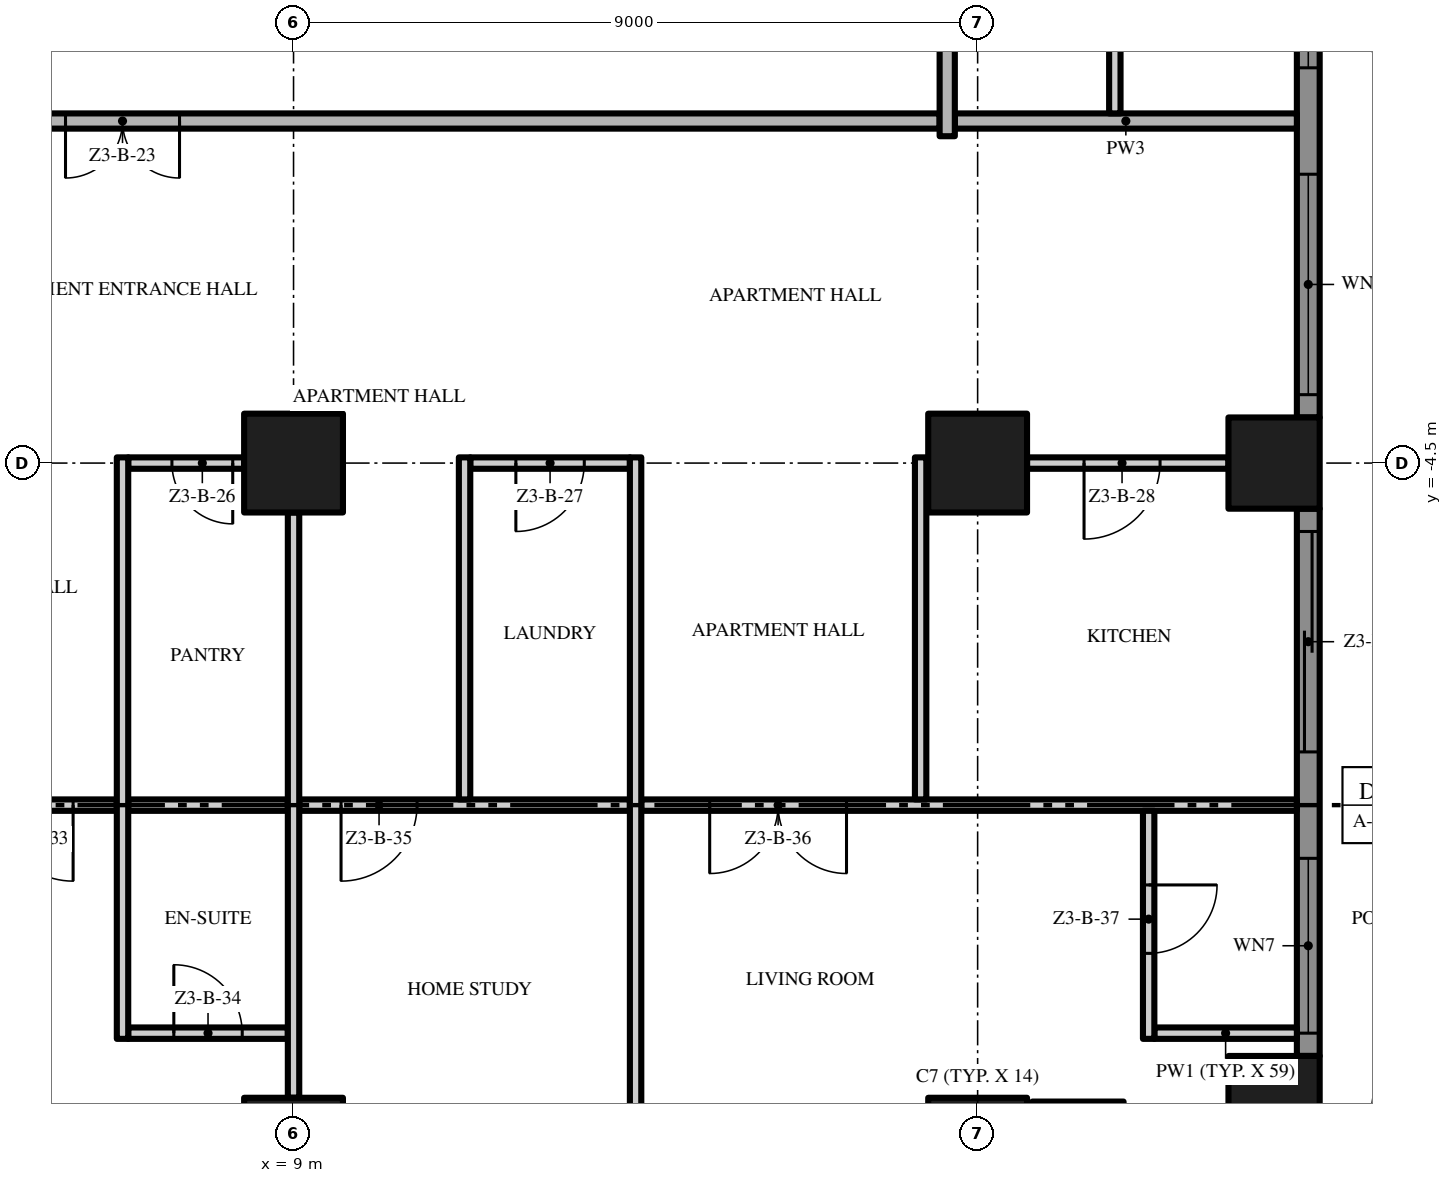
"""IFC4 building model, lengths in metres.
Left out: names, types, materials, properties, quantities, classifications, styles, units other than length and angle.
Written with IfcOpenShell. Run it as: python <this file> out.ifc"""

import sys

from ifc_helpers import new_model, si_unit, direction, frame, frame_2d, origin, origin_2d, place, context, subcontext, project, spatial, polyline, rectangle, outline, extrude, element, fill, save


model = new_model("IFC4")
c1 = context("Model", 3, precision=1e-05, world=origin(), true_north=direction((0.0, 1.0)))
c2 = subcontext(c1, "Body", "Model", "MODEL_VIEW")
j1 = project(units=[si_unit("LENGTHUNIT", "METRE"), si_unit("PLANEANGLEUNIT", "RADIAN")], contexts=[c1])
p1 = place(None, origin())
s1 = spatial("IfcSite", under=j1, at=p1, CompositionType="ELEMENT")
p2 = place(p1, origin())
s2 = spatial("IfcBuilding", under=s1, at=p2, CompositionType="ELEMENT")
p3 = place(p2, frame((0.0, 0.0, 136.4)))
s3 = spatial("IfcBuildingStorey", under=s2, at=p3, CompositionType="ELEMENT", Elevation=136.4)
for number, where, z_axis, x_axis in (
    (1, (18.0, -13.5, 0.0), (0.0, 0.0, 1.0), (1.0, 0.0, 0.0)),
    (2, (18.0, -4.5, 0.0), (0.0, 0.0, 1.0), (1.0, 0.0, 0.0)),
):
    element("IfcColumn", number, at=place(p3, frame(where, z_axis=z_axis, x_axis=x_axis)), inside=s3, PredefinedType="COLUMN", context=c2, shape_type="SweptSolid", body=[
        extrude(rectangle(XDim=1.3, YDim=1.3, at=origin_2d()), origin(), (0.0, 0.0, 1.0), 3.5),
    ])
for number, where, z_axis, x_axis in (
    (3, (21.9, -12.9, 0.0), (0.0, 0.0, 1.0), (1.0, 0.0, 0.0)),
    (4, (19.32, -13.5, 0.0), (0.0, 0.0, 1.0), (1.0, 0.0, 0.0)),
    (5, (21.9, -4.5, 0.0), (0.0, 0.0, 1.0), (1.0, 0.0, 0.0)),
):
    element("IfcColumn", number, at=place(p3, frame(where, z_axis=z_axis, x_axis=x_axis)), inside=s3, PredefinedType="COLUMN", context=c2, shape_type="SweptSolid", body=[
        extrude(rectangle(XDim=1.2, YDim=1.2, at=origin_2d()), origin(), (0.0, 0.0, 1.0), 3.5),
    ])
for number, where, z_axis, x_axis in (
    (6, (9.0, -13.5, 0.0), (0.0, 0.0, 1.0), (1.0, 0.0, 0.0)),
    (7, (9.0, -4.5, 0.0), (0.0, 0.0, 1.0), (1.0, 0.0, 0.0)),
):
    element("IfcColumn", number, at=place(p3, frame(where, z_axis=z_axis, x_axis=x_axis)), inside=s3, PredefinedType="COLUMN", context=c2, shape_type="SweptSolid", body=[
        extrude(rectangle(XDim=1.3, YDim=1.3, at=origin_2d()), origin(), (0.0, 0.0, 1.0), 3.5),
    ])
p4 = place(p3, frame((22.35, -5.1, 0.0), z_axis=(0.0, 0.0, 1.0), x_axis=(0.0, -1.0, 0.0)))
e8 = element("IfcWall", 8, at=p4, inside=s3, PredefinedType="SOLIDWALL", context=c2, shape_type="SweptSolid", body=[
    extrude(rectangle(XDim=7.2, YDim=0.3, at=frame_2d((3.6, 0.0))), origin(), (0.0, 0.0, 1.0), 3.5),
])
p5 = place(p4, frame((4.6, 0.0, 0.45)))
e9 = element("IfcOpeningElement", 9, at=p5, cuts=e8, PredefinedType="OPENING", context=c2, shape_type="SweptSolid", body=[
    extrude(rectangle(XDim=2.3, YDim=2.65, at=frame_2d((1.15, 1.325))), frame((0.0, 0.16, 0.0), z_axis=(0.0, -1.0, 0.0), x_axis=(1.0, 0.0, 0.0)), (0.0, 0.0, 1.0), 0.32),
])
p6 = place(p4, frame((0.3, 0.0, 0.0)))
e10 = element("IfcOpeningElement", 10, at=p6, cuts=e8, PredefinedType="OPENING", context=c2, shape_type="SweptSolid", body=[
    extrude(rectangle(XDim=2.9, YDim=2.4, at=frame_2d((1.45, 1.2))), frame((0.0, 0.16, 0.0), z_axis=(0.0, -1.0, 0.0), x_axis=(1.0, 0.0, 0.0)), (0.0, 0.0, 1.0), 0.32),
])
p7 = place(p3, frame((22.35, 3.9, 0.0), z_axis=(0.0, 0.0, 1.0), x_axis=(0.0, -1.0, 0.0)))
e11 = element("IfcWall", 11, at=p7, inside=s3, PredefinedType="SOLIDWALL", context=c2, shape_type="SweptSolid", body=[
    extrude(rectangle(XDim=7.8, YDim=0.3, at=frame_2d((3.9, 0.0))), origin(), (0.0, 0.0, 1.0), 3.5),
])
p8 = place(p7, frame((4.6, 0.0, 0.45)))
e12 = element("IfcOpeningElement", 12, at=p8, cuts=e11, PredefinedType="OPENING", context=c2, shape_type="SweptSolid", body=[
    extrude(rectangle(XDim=2.9, YDim=2.65, at=frame_2d((1.45, 1.325))), frame((0.0, 0.16, 0.0), z_axis=(0.0, -1.0, 0.0), x_axis=(1.0, 0.0, 0.0)), (0.0, 0.0, 1.0), 0.32),
])
p9 = place(p7, frame((0.3, 0.0, 0.45)))
e13 = element("IfcOpeningElement", 13, at=p9, cuts=e11, PredefinedType="OPENING", context=c2, shape_type="SweptSolid", body=[
    extrude(rectangle(XDim=2.9, YDim=2.65, at=frame_2d((1.45, 1.325))), frame((0.0, 0.16, 0.0), z_axis=(0.0, -1.0, 0.0), x_axis=(1.0, 0.0, 0.0)), (0.0, 0.0, 1.0), 0.32),
])
p10 = place(p3, origin())
e14 = element("IfcWall", 14, at=p10, inside=s3, PredefinedType="USERDEFINED", context=c2, shape_type="SweptSolid", body=[
    extrude(outline(polyline([(23.1, -13.5), (23.329, -12.0), (23.929, -10.5), (24.671, -9.0), (25.271, -7.5), (25.5, -6.0), (25.271, -4.5), (24.671, -3.0), (23.929, -1.5), (23.329, 0.0), (23.1, 1.5), (23.329, 3.0), (23.929, 4.5), (24.671, 6.0), (25.271, 7.5), (25.5, 9.0), (25.271, 10.5), (24.671, 12.0), (23.929, 13.5), (23.329, 15.0), (23.1, 16.5), (23.329, 18.0), (23.082, 18.038), (22.847, 16.5), (23.086, 14.934), (23.701, 13.398), (24.442, 11.898), (25.028, 10.434), (25.247, 9.0), (25.028, 7.566), (24.442, 6.102), (23.701, 4.602), (23.086, 3.066), (22.847, 1.5), (23.086, -0.066), (23.701, -1.602), (24.442, -3.102), (25.028, -4.566), (25.247, -6.0), (25.028, -7.434), (24.442, -8.898), (23.701, -10.398), (23.086, -11.934), (22.853, -13.462), (23.1, -13.5)])), origin(), (0.0, 0.0, 1.0), 0.9),
])
p11 = place(p3, frame((6.825, -12.0, 0.0), z_axis=(0.0, 0.0, 1.0), x_axis=(1.0, 0.0, 0.0)))
e15 = element("IfcWall", 15, at=p11, inside=s3, PredefinedType="PARTITIONING", context=c2, shape_type="SweptSolid", body=[
    extrude(rectangle(XDim=2.1, YDim=0.15, at=frame_2d((1.05, 0.0))), origin(), (0.0, 0.0, 1.0), 3.5),
])
p12 = place(p11, frame((0.6, 0.0, 0.0)))
e16 = element("IfcOpeningElement", 16, at=p12, cuts=e15, PredefinedType="OPENING", context=c2, shape_type="SweptSolid", body=[
    extrude(rectangle(XDim=0.9, YDim=2.1, at=frame_2d((0.45, 1.05))), frame((0.0, 0.085, 0.0), z_axis=(0.0, -1.0, 0.0), x_axis=(1.0, 0.0, 0.0)), (0.0, 0.0, 1.0), 0.17),
])
p13 = place(p3, frame((20.325, -12.0, 0.0), z_axis=(0.0, 0.0, 1.0), x_axis=(1.0, 0.0, 0.0)))
e17 = element("IfcWall", 17, at=p13, inside=s3, PredefinedType="PARTITIONING", context=c2, shape_type="SweptSolid", body=[
    extrude(rectangle(XDim=1.875, YDim=0.15, at=frame_2d((0.938, 0.0))), origin(), (0.0, 0.0, 1.0), 3.5),
])
p14 = place(p3, frame((6.675, -9.0, 0.0), z_axis=(0.0, 0.0, 1.0), x_axis=(-1.0, 0.0, 0.0)))
e18 = element("IfcWall", 18, at=p14, inside=s3, PredefinedType="PARTITIONING", context=c2, shape_type="SweptSolid", body=[
    extrude(rectangle(XDim=4.35, YDim=0.15, at=frame_2d((2.175, 0.0))), origin(), (0.0, 0.0, 1.0), 3.5),
])
p15 = place(p14, frame((2.8, 0.0, 0.0)))
e19 = element("IfcOpeningElement", 19, at=p15, cuts=e18, PredefinedType="OPENING", context=c2, shape_type="SweptSolid", body=[
    extrude(rectangle(XDim=1.0, YDim=2.4, at=frame_2d((0.5, 1.2))), frame((0.0, 0.085, 0.0), z_axis=(0.0, -1.0, 0.0), x_axis=(1.0, 0.0, 0.0)), (0.0, 0.0, 1.0), 0.17),
])
p16 = place(p14, frame((0.575, 0.0, 0.0)))
e20 = element("IfcOpeningElement", 20, at=p16, cuts=e18, PredefinedType="OPENING", context=c2, shape_type="SweptSolid", body=[
    extrude(rectangle(XDim=1.0, YDim=2.4, at=frame_2d((0.5, 1.2))), frame((0.0, 0.085, 0.0), z_axis=(0.0, -1.0, 0.0), x_axis=(1.0, 0.0, 0.0)), (0.0, 0.0, 1.0), 0.17),
])
p17 = place(p3, frame((6.825, -9.0, 0.0), z_axis=(0.0, 0.0, 1.0), x_axis=(1.0, 0.0, 0.0)))
e21 = element("IfcWall", 21, at=p17, inside=s3, PredefinedType="PARTITIONING", context=c2, shape_type="SweptSolid", body=[
    extrude(rectangle(XDim=2.1, YDim=0.15, at=frame_2d((1.05, 0.0))), origin(), (0.0, 0.0, 1.0), 3.5),
])
p18 = place(p3, frame((13.425, -9.0, 0.0), z_axis=(0.0, 0.0, 1.0), x_axis=(-1.0, 0.0, 0.0)))
e22 = element("IfcWall", 22, at=p18, inside=s3, PredefinedType="PARTITIONING", context=c2, shape_type="SweptSolid", body=[
    extrude(rectangle(XDim=4.35, YDim=0.15, at=frame_2d((2.175, 0.0))), origin(), (0.0, 0.0, 1.0), 3.5),
])
p19 = place(p18, frame((2.8, 0.0, 0.0)))
e23 = element("IfcOpeningElement", 23, at=p19, cuts=e22, PredefinedType="OPENING", context=c2, shape_type="SweptSolid", body=[
    extrude(rectangle(XDim=1.0, YDim=2.4, at=frame_2d((0.5, 1.2))), frame((0.0, 0.085, 0.0), z_axis=(0.0, -1.0, 0.0), x_axis=(1.0, 0.0, 0.0)), (0.0, 0.0, 1.0), 0.17),
])
p20 = place(p3, frame((22.2, -9.0, 0.0), z_axis=(0.0, 0.0, 1.0), x_axis=(-1.0, 0.0, 0.0)))
e24 = element("IfcWall", 24, at=p20, inside=s3, PredefinedType="PARTITIONING", context=c2, shape_type="SweptSolid", body=[
    extrude(rectangle(XDim=8.625, YDim=0.15, at=frame_2d((4.312, 0.0))), origin(), (0.0, 0.0, 1.0), 3.5),
])
p21 = place(p20, frame((5.925, 0.0, 0.0)))
e25 = element("IfcOpeningElement", 25, at=p21, cuts=e24, PredefinedType="OPENING", context=c2, shape_type="SweptSolid", body=[
    extrude(rectangle(XDim=1.8, YDim=2.4, at=frame_2d((0.9, 1.2))), frame((0.0, 0.085, 0.0), z_axis=(0.0, -1.0, 0.0), x_axis=(1.0, 0.0, 0.0)), (0.0, 0.0, 1.0), 0.17),
])
p22 = place(p3, frame((8.35, -4.5, 0.0), z_axis=(0.0, 0.0, 1.0), x_axis=(-1.0, 0.0, 0.0)))
e26 = element("IfcWall", 26, at=p22, inside=s3, PredefinedType="PARTITIONING", context=c2, shape_type="SweptSolid", body=[
    extrude(rectangle(XDim=1.525, YDim=0.15, at=frame_2d((0.762, 0.0))), origin(), (0.0, 0.0, 1.0), 3.5),
])
p23 = place(p22, frame((0.15, 0.0, 0.0)))
e27 = element("IfcOpeningElement", 27, at=p23, cuts=e26, PredefinedType="OPENING", context=c2, shape_type="SweptSolid", body=[
    extrude(rectangle(XDim=0.8, YDim=2.0, at=frame_2d((0.4, 1.0))), frame((0.0, 0.085, 0.0), z_axis=(0.0, -1.0, 0.0), x_axis=(1.0, 0.0, 0.0)), (0.0, 0.0, 1.0), 0.17),
])
p24 = place(p3, frame((13.425, -4.5, 0.0), z_axis=(0.0, 0.0, 1.0), x_axis=(-1.0, 0.0, 0.0)))
e28 = element("IfcWall", 28, at=p24, inside=s3, PredefinedType="PARTITIONING", context=c2, shape_type="SweptSolid", body=[
    extrude(rectangle(XDim=2.1, YDim=0.15, at=frame_2d((1.05, 0.0))), origin(), (0.0, 0.0, 1.0), 3.5),
])
p25 = place(p24, frame((0.6, 0.0, 0.0)))
e29 = element("IfcOpeningElement", 29, at=p25, cuts=e28, PredefinedType="OPENING", context=c2, shape_type="SweptSolid", body=[
    extrude(rectangle(XDim=0.9, YDim=2.1, at=frame_2d((0.45, 1.05))), frame((0.0, 0.085, 0.0), z_axis=(0.0, -1.0, 0.0), x_axis=(1.0, 0.0, 0.0)), (0.0, 0.0, 1.0), 0.17),
])
p26 = place(p3, frame((21.3, -4.5, 0.0), z_axis=(0.0, 0.0, 1.0), x_axis=(-1.0, 0.0, 0.0)))
e30 = element("IfcWall", 30, at=p26, inside=s3, PredefinedType="PARTITIONING", context=c2, shape_type="SweptSolid", body=[
    extrude(rectangle(XDim=2.65, YDim=0.15, at=frame_2d((1.325, 0.0))), origin(), (0.0, 0.0, 1.0), 3.5),
])
p27 = place(p26, frame((0.9, 0.0, 0.0)))
e31 = element("IfcOpeningElement", 31, at=p27, cuts=e30, PredefinedType="OPENING", context=c2, shape_type="SweptSolid", body=[
    extrude(rectangle(XDim=1.0, YDim=2.4, at=frame_2d((0.5, 1.2))), frame((0.0, 0.085, 0.0), z_axis=(0.0, -1.0, 0.0), x_axis=(1.0, 0.0, 0.0)), (0.0, 0.0, 1.0), 0.17),
])
p28 = place(p3, frame((17.5, 0.0, 0.0), z_axis=(0.0, 0.0, 1.0), x_axis=(-1.0, 0.0, 0.0)))
e32 = element("IfcWall", 32, at=p28, inside=s3, PredefinedType="PARTITIONING", context=c2, shape_type="SweptSolid", body=[
    extrude(rectangle(XDim=35.0, YDim=0.2, at=frame_2d((17.5, 0.0))), origin(), (0.0, 0.0, 1.0), 3.5),
])
p29 = place(p28, frame((28.0, 0.0, 0.0)))
e33 = element("IfcOpeningElement", 33, at=p29, cuts=e32, PredefinedType="OPENING", context=c2, shape_type="SweptSolid", body=[
    extrude(rectangle(XDim=1.5, YDim=2.4, at=frame_2d((0.75, 1.2))), frame((0.0, 0.11, 0.0), z_axis=(0.0, -1.0, 0.0), x_axis=(1.0, 0.0, 0.0)), (0.0, 0.0, 1.0), 0.22),
])
p30 = place(p28, frame((10.0, 0.0, 0.0)))
e34 = element("IfcOpeningElement", 34, at=p30, cuts=e32, PredefinedType="OPENING", context=c2, shape_type="SweptSolid", body=[
    extrude(rectangle(XDim=1.5, YDim=2.4, at=frame_2d((0.75, 1.2))), frame((0.0, 0.11, 0.0), z_axis=(0.0, -1.0, 0.0), x_axis=(1.0, 0.0, 0.0)), (0.0, 0.0, 1.0), 0.22),
])
p31 = place(p3, frame((17.7, 0.0, 0.0), z_axis=(0.0, 0.0, 1.0), x_axis=(1.0, 0.0, 0.0)))
e35 = element("IfcWall", 35, at=p31, inside=s3, PredefinedType="PARTITIONING", context=c2, shape_type="SweptSolid", body=[
    extrude(rectangle(XDim=4.5, YDim=0.2, at=frame_2d((2.25, 0.0))), origin(), (0.0, 0.0, 1.0), 3.5),
])
p32 = place(p3, frame((6.75, -12.075, 0.0), z_axis=(0.0, 0.0, 1.0), x_axis=(0.0, 1.0, 0.0)))
e36 = element("IfcWall", 36, at=p32, inside=s3, PredefinedType="PARTITIONING", context=c2, shape_type="SweptSolid", body=[
    extrude(rectangle(XDim=7.65, YDim=0.15, at=frame_2d((3.825, 0.0))), origin(), (0.0, 0.0, 1.0), 3.5),
])
p33 = place(p3, frame((9.0, -12.85, 0.0), z_axis=(0.0, 0.0, 1.0), x_axis=(0.0, 1.0, 0.0)))
e37 = element("IfcWall", 37, at=p33, inside=s3, PredefinedType="PARTITIONING", context=c2, shape_type="SweptSolid", body=[
    extrude(rectangle(XDim=7.7, YDim=0.15, at=frame_2d((3.85, 0.0))), origin(), (0.0, 0.0, 1.0), 3.5),
])
p34 = place(p3, frame((11.25, -8.925, 0.0), z_axis=(0.0, 0.0, 1.0), x_axis=(0.0, 1.0, 0.0)))
e38 = element("IfcWall", 38, at=p34, inside=s3, PredefinedType="PARTITIONING", context=c2, shape_type="SweptSolid", body=[
    extrude(rectangle(XDim=4.5, YDim=0.15, at=frame_2d((2.25, 0.0))), origin(), (0.0, 0.0, 1.0), 3.5),
])
p35 = place(p3, frame((13.5, -17.7, 0.0), z_axis=(0.0, 0.0, 1.0), x_axis=(0.0, 1.0, 0.0)))
e39 = element("IfcWall", 39, at=p35, inside=s3, PredefinedType="PARTITIONING", context=c2, shape_type="SweptSolid", body=[
    extrude(rectangle(XDim=13.275, YDim=0.15, at=frame_2d((6.638, 0.0))), origin(), (0.0, 0.0, 1.0), 3.5),
])
p36 = place(p3, frame((17.25, -8.925, 0.0), z_axis=(0.0, 0.0, 1.0), x_axis=(0.0, 1.0, 0.0)))
e40 = element("IfcWall", 40, at=p36, inside=s3, PredefinedType="PARTITIONING", context=c2, shape_type="SweptSolid", body=[
    extrude(rectangle(XDim=4.5, YDim=0.15, at=frame_2d((2.25, 0.0))), origin(), (0.0, 0.0, 1.0), 3.5),
])
p37 = place(p3, frame((17.6, -0.2, 0.0), z_axis=(0.0, 0.0, 1.0), x_axis=(0.0, 1.0, 0.0)))
e41 = element("IfcWall", 41, at=p37, inside=s3, PredefinedType="PARTITIONING", context=c2, shape_type="SweptSolid", body=[
    extrude(rectangle(XDim=4.05, YDim=0.2, at=frame_2d((2.025, 0.0))), origin(), (0.0, 0.0, 1.0), 3.5),
])
p38 = place(p3, frame((19.805, 0.1, 0.0), z_axis=(0.0, 0.0, 1.0), x_axis=(0.0, 1.0, 0.0)))
e42 = element("IfcWall", 42, at=p38, inside=s3, PredefinedType="PARTITIONING", context=c2, shape_type="SweptSolid", body=[
    extrude(rectangle(XDim=2.225, YDim=0.15, at=frame_2d((1.113, 0.0))), origin(), (0.0, 0.0, 1.0), 3.5),
])
p39 = place(p3, frame((20.25, -9.075, 0.0), z_axis=(0.0, 0.0, 1.0), x_axis=(0.0, -1.0, 0.0)))
e43 = element("IfcWall", 43, at=p39, inside=s3, PredefinedType="PARTITIONING", context=c2, shape_type="SweptSolid", body=[
    extrude(rectangle(XDim=3.0, YDim=0.15, at=frame_2d((1.5, 0.0))), origin(), (0.0, 0.0, 1.0), 3.5),
])
p40 = place(p39, frame((0.975, 0.0, 0.0)))
e44 = element("IfcOpeningElement", 44, at=p40, cuts=e43, PredefinedType="OPENING", context=c2, shape_type="SweptSolid", body=[
    extrude(rectangle(XDim=0.9, YDim=2.1, at=frame_2d((0.45, 1.05))), frame((0.0, 0.085, 0.0), z_axis=(0.0, -1.0, 0.0), x_axis=(1.0, 0.0, 0.0)), (0.0, 0.0, 1.0), 0.17),
])
p41 = place(p5, origin())
e45 = element("IfcWindow", 45, at=p41, inside=s3, PartitioningType="SINGLE_PANEL", PredefinedType="WINDOW", context=c2, shape_type="SweptSolid", body=[
    extrude(rectangle(XDim=2.3, YDim=2.65, at=frame_2d((1.15, 1.325))), frame((0.0, 0.03, 0.0), z_axis=(0.0, -1.0, 0.0), x_axis=(1.0, 0.0, 0.0)), (0.0, 0.0, 1.0), 0.06),
])
fill(e9, e45)
p42 = place(p6, origin())
e46 = element("IfcDoor", 46, at=p42, inside=s3, OperationType="SINGLE_SWING_LEFT", PredefinedType="DOOR", context=c2, shape_type="SweptSolid", body=[
    extrude(rectangle(XDim=2.9, YDim=2.4, at=frame_2d((1.45, 1.2))), frame((0.0, 0.025, 0.0), z_axis=(0.0, -1.0, 0.0), x_axis=(1.0, 0.0, 0.0)), (0.0, 0.0, 1.0), 0.05),
])
fill(e10, e46)
p43 = place(p8, origin())
e47 = element("IfcWindow", 47, at=p43, inside=s3, PartitioningType="SINGLE_PANEL", PredefinedType="WINDOW", context=c2, shape_type="SweptSolid", body=[
    extrude(rectangle(XDim=2.9, YDim=2.65, at=frame_2d((1.45, 1.325))), frame((0.0, 0.03, 0.0), z_axis=(0.0, -1.0, 0.0), x_axis=(1.0, 0.0, 0.0)), (0.0, 0.0, 1.0), 0.06),
])
fill(e12, e47)
p44 = place(p9, origin())
e48 = element("IfcWindow", 48, at=p44, inside=s3, PartitioningType="SINGLE_PANEL", PredefinedType="WINDOW", context=c2, shape_type="SweptSolid", body=[
    extrude(rectangle(XDim=2.9, YDim=2.65, at=frame_2d((1.45, 1.325))), frame((0.0, 0.03, 0.0), z_axis=(0.0, -1.0, 0.0), x_axis=(1.0, 0.0, 0.0)), (0.0, 0.0, 1.0), 0.06),
])
fill(e13, e48)
p45 = place(p30, origin())
e49 = element("IfcDoor", 49, at=p45, inside=s3, OperationType="DOUBLE_DOOR_SINGLE_SWING", PredefinedType="DOOR", context=c2, shape_type="SweptSolid", body=[
    extrude(rectangle(XDim=1.5, YDim=2.4, at=frame_2d((0.75, 1.2))), frame((0.0, 0.025, 0.0), z_axis=(0.0, -1.0, 0.0), x_axis=(1.0, 0.0, 0.0)), (0.0, 0.0, 1.0), 0.05),
])
fill(e34, e49)
p46 = place(p23, origin())
e50 = element("IfcDoor", 50, at=p46, inside=s3, OperationType="SINGLE_SWING_LEFT", PredefinedType="DOOR", context=c2, shape_type="SweptSolid", body=[
    extrude(rectangle(XDim=0.8, YDim=2.0, at=frame_2d((0.4, 1.0))), frame((0.0, 0.025, 0.0), z_axis=(0.0, -1.0, 0.0), x_axis=(1.0, 0.0, 0.0)), (0.0, 0.0, 1.0), 0.05),
])
fill(e27, e50)
p47 = place(p25, origin())
e51 = element("IfcDoor", 51, at=p47, inside=s3, OperationType="SINGLE_SWING_RIGHT", PredefinedType="DOOR", context=c2, shape_type="SweptSolid", body=[
    extrude(rectangle(XDim=0.9, YDim=2.1, at=frame_2d((0.45, 1.05))), frame((0.0, 0.025, 0.0), z_axis=(0.0, -1.0, 0.0), x_axis=(1.0, 0.0, 0.0)), (0.0, 0.0, 1.0), 0.05),
])
fill(e29, e51)
p48 = place(p27, origin())
e52 = element("IfcDoor", 52, at=p48, inside=s3, OperationType="SINGLE_SWING_RIGHT", PredefinedType="DOOR", context=c2, shape_type="SweptSolid", body=[
    extrude(rectangle(XDim=1.0, YDim=2.4, at=frame_2d((0.5, 1.2))), frame((0.0, 0.025, 0.0), z_axis=(0.0, -1.0, 0.0), x_axis=(1.0, 0.0, 0.0)), (0.0, 0.0, 1.0), 0.05),
])
fill(e31, e52)
p49 = place(p16, origin())
e53 = element("IfcDoor", 53, at=p49, inside=s3, OperationType="SINGLE_SWING_LEFT", PredefinedType="DOOR", context=c2, shape_type="SweptSolid", body=[
    extrude(rectangle(XDim=1.0, YDim=2.4, at=frame_2d((0.5, 1.2))), frame((0.0, 0.025, 0.0), z_axis=(0.0, -1.0, 0.0), x_axis=(1.0, 0.0, 0.0)), (0.0, 0.0, 1.0), 0.05),
])
fill(e20, e53)
p50 = place(p12, origin())
e54 = element("IfcDoor", 54, at=p50, inside=s3, OperationType="SINGLE_SWING_LEFT", PredefinedType="DOOR", context=c2, shape_type="SweptSolid", body=[
    extrude(rectangle(XDim=0.9, YDim=2.1, at=frame_2d((0.45, 1.05))), frame((0.0, 0.025, 0.0), z_axis=(0.0, -1.0, 0.0), x_axis=(1.0, 0.0, 0.0)), (0.0, 0.0, 1.0), 0.05),
])
fill(e16, e54)
p51 = place(p19, origin())
e55 = element("IfcDoor", 55, at=p51, inside=s3, OperationType="SINGLE_SWING_RIGHT", PredefinedType="DOOR", context=c2, shape_type="SweptSolid", body=[
    extrude(rectangle(XDim=1.0, YDim=2.4, at=frame_2d((0.5, 1.2))), frame((0.0, 0.025, 0.0), z_axis=(0.0, -1.0, 0.0), x_axis=(1.0, 0.0, 0.0)), (0.0, 0.0, 1.0), 0.05),
])
fill(e23, e55)
p52 = place(p21, origin())
e56 = element("IfcDoor", 56, at=p52, inside=s3, OperationType="DOUBLE_DOOR_SINGLE_SWING", PredefinedType="DOOR", context=c2, shape_type="SweptSolid", body=[
    extrude(rectangle(XDim=1.8, YDim=2.4, at=frame_2d((0.9, 1.2))), frame((0.0, 0.025, 0.0), z_axis=(0.0, -1.0, 0.0), x_axis=(1.0, 0.0, 0.0)), (0.0, 0.0, 1.0), 0.05),
])
fill(e25, e56)
p53 = place(p40, origin())
e57 = element("IfcDoor", 57, at=p53, inside=s3, OperationType="SINGLE_SWING_LEFT", PredefinedType="DOOR", context=c2, shape_type="SweptSolid", body=[
    extrude(rectangle(XDim=0.9, YDim=2.1, at=frame_2d((0.45, 1.05))), frame((0.0, 0.025, 0.0), z_axis=(0.0, -1.0, 0.0), x_axis=(1.0, 0.0, 0.0)), (0.0, 0.0, 1.0), 0.05),
])
fill(e44, e57)
save(model, sys.argv[1])
